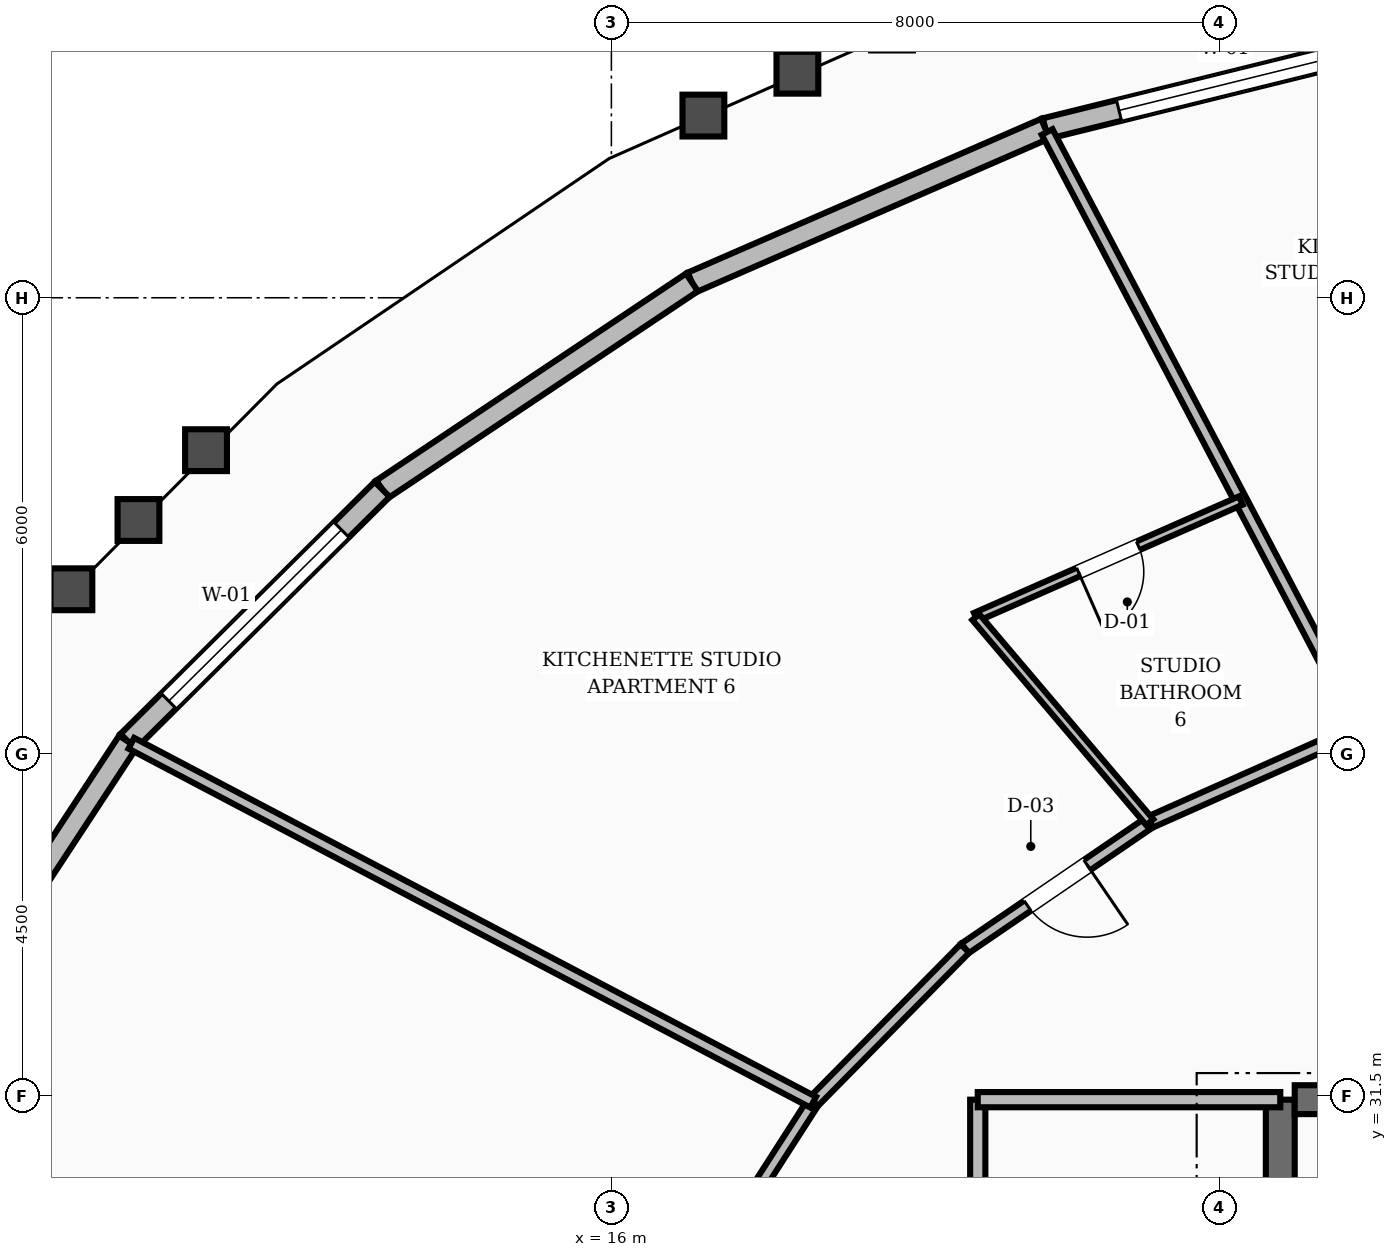
"""IFC4 building model, lengths in metres.
Left out: names, types, materials, properties, quantities, classifications, styles, units other than length and angle.
Written with IfcOpenShell. Run it as: python <this file> out.ifc"""

import sys

from ifc_helpers import new_model, si_unit, direction, frame, frame_2d, origin, place, context, subcontext, project, spatial, rectangle, extrude, element, fill, save


model = new_model("IFC4")
c1 = context("Model", 3, precision=1e-05, world=origin(), true_north=direction((0.0, 1.0)))
c2 = subcontext(c1, "Body", "Model", "MODEL_VIEW")
j1 = project(units=[si_unit("LENGTHUNIT", "METRE"), si_unit("PLANEANGLEUNIT", "RADIAN")], contexts=[c1])
p1 = place(None, origin())
s1 = spatial("IfcSite", under=j1, at=p1, CompositionType="ELEMENT")
p2 = place(p1, origin())
s2 = spatial("IfcBuilding", under=s1, at=p2, CompositionType="ELEMENT")
p3 = place(p2, frame((0.0, 0.0, 66.4)))
s3 = spatial("IfcBuildingStorey", under=s2, at=p3, CompositionType="ELEMENT", Elevation=66.4)
p4 = place(p3, frame((24.8, 25.15, 0.0), z_axis=(0.0, 0.0, 1.0), x_axis=(0.0, 1.0, 0.0)))
e1 = element("IfcWall", 1, at=p4, inside=s3, PredefinedType="SHEAR", context=c2, shape_type="SweptSolid", body=[
    extrude(rectangle(XDim=6.3, YDim=0.38, at=frame_2d((3.15, 0.0))), origin(), (0.0, 0.0, 1.0), 3.6),
])
p5 = place(p3, frame((24.99, 31.45, 0.0), z_axis=(0.0, 0.0, 1.0), x_axis=(1.0, 0.0, 0.0)))
e2 = element("IfcWall", 2, at=p5, inside=s3, PredefinedType="SHEAR", context=c2, shape_type="SweptSolid", body=[
    extrude(rectangle(XDim=3.21, YDim=0.38, at=frame_2d((1.605, 0.0))), origin(), (0.0, 0.0, 1.0), 3.6),
])
p6 = place(p3, frame((26.754, 45.471, 0.0), z_axis=(0.0, 0.0, 1.0), x_axis=(-0.970832238087, -0.239759807915, 0.0)))
e3 = element("IfcWall", 3, at=p6, inside=s3, PredefinedType="STANDARD", context=c2, shape_type="SweptSolid", body=[
    extrude(rectangle(XDim=5.196, YDim=0.28, at=frame_2d((2.598, 0.0))), origin(), (0.0, 0.0, 1.0), 2.71),
])
p7 = place(p6, frame((0.998, 0.0, 0.8)))
e4 = element("IfcOpeningElement", 4, at=p7, cuts=e3, PredefinedType="OPENING", context=c2, shape_type="SweptSolid", body=[
    extrude(rectangle(XDim=3.2, YDim=1.65, at=frame_2d((1.6, 0.825))), frame((0.0, 0.15, 0.0), z_axis=(0.0, -1.0, 0.0), x_axis=(1.0, 0.0, 0.0)), (0.0, 0.0, 1.0), 0.3),
])
p8 = place(p3, frame((21.709, 44.225, 0.0), z_axis=(0.0, 0.0, 1.0), x_axis=(-0.916956720631, -0.398986682096, 0.0)))
e5 = element("IfcWall", 5, at=p8, inside=s3, PredefinedType="STANDARD", context=c2, shape_type="SweptSolid", body=[
    extrude(rectangle(XDim=5.07, YDim=0.28, at=frame_2d((2.535, 0.0))), origin(), (0.0, 0.0, 1.0), 2.71),
])
p9 = place(p3, frame((17.06, 42.202, 0.0), z_axis=(0.0, 0.0, 1.0), x_axis=(-0.83148272081, -0.555550614251, 0.0)))
e6 = element("IfcWall", 6, at=p9, inside=s3, PredefinedType="STANDARD", context=c2, shape_type="SweptSolid", body=[
    extrude(rectangle(XDim=4.901, YDim=0.28, at=frame_2d((2.45, 0.0))), origin(), (0.0, 0.0, 1.0), 2.71),
])
p10 = place(p3, frame((12.985, 39.479, 0.0), z_axis=(0.0, 0.0, 1.0), x_axis=(-0.710003239363, -0.704198409608, 0.0)))
e7 = element("IfcWall", 7, at=p10, inside=s3, PredefinedType="STANDARD", context=c2, shape_type="SweptSolid", body=[
    extrude(rectangle(XDim=4.71, YDim=0.28, at=frame_2d((2.355, 0.0))), origin(), (0.0, 0.0, 1.0), 2.71),
])
p11 = place(p10, frame((0.755, 0.0, 0.8)))
e8 = element("IfcOpeningElement", 8, at=p11, cuts=e7, PredefinedType="OPENING", context=c2, shape_type="SweptSolid", body=[
    extrude(rectangle(XDim=3.2, YDim=1.65, at=frame_2d((1.6, 0.825))), frame((0.0, 0.15, 0.0), z_axis=(0.0, -1.0, 0.0), x_axis=(1.0, 0.0, 0.0)), (0.0, 0.0, 1.0), 0.3),
])
p12 = place(p3, frame((9.64, 36.162, 0.0), z_axis=(0.0, 0.0, 1.0), x_axis=(-0.54881308027, -0.83594509564, 0.0)))
e9 = element("IfcWall", 9, at=p12, inside=s3, PredefinedType="STANDARD", context=c2, shape_type="SweptSolid", body=[
    extrude(rectangle(XDim=4.528, YDim=0.28, at=frame_2d((2.264, 0.0))), origin(), (0.0, 0.0, 1.0), 2.71),
])
p13 = place(p3, frame((20.82, 28.32, 0.0), z_axis=(0.0, 0.0, 1.0), x_axis=(0.0, 1.0, 0.0)))
e10 = element("IfcWall", 10, at=p13, inside=s3, PredefinedType="SOLIDWALL", context=c2, shape_type="SweptSolid", body=[
    extrude(rectangle(XDim=3.13, YDim=0.2, at=frame_2d((1.565, 0.0))), origin(), (0.0, 0.0, 1.0), 2.71),
])
p14 = place(p13, frame((1.09, 0.0, 0.0)))
e11 = element("IfcOpeningElement", 11, at=p14, cuts=e10, PredefinedType="OPENING", context=c2, shape_type="SweptSolid", body=[
    extrude(rectangle(XDim=0.95, YDim=2.1, at=frame_2d((0.475, 1.05))), frame((0.0, 0.11, 0.0), z_axis=(0.0, -1.0, 0.0), x_axis=(1.0, 0.0, 0.0)), (0.0, 0.0, 1.0), 0.22),
])
p15 = place(p3, frame((20.82, 31.45, 0.0), z_axis=(0.0, 0.0, 1.0), x_axis=(1.0, 0.0, 0.0)))
e12 = element("IfcWall", 12, at=p15, inside=s3, PredefinedType="SOLIDWALL", context=c2, shape_type="SweptSolid", body=[
    extrude(rectangle(XDim=3.98, YDim=0.2, at=frame_2d((1.99, 0.0))), origin(), (0.0, 0.0, 1.0), 2.71),
])
p16 = place(p3, frame((25.858, 36.334, 0.0), z_axis=(0.0, 0.0, 1.0), x_axis=(-0.913768445178, -0.406235434936, 0.0)))
e13 = element("IfcWall", 13, at=p16, inside=s3, PredefinedType="SOLIDWALL", context=c2, shape_type="SweptSolid", body=[
    extrude(rectangle(XDim=3.037, YDim=0.16, at=frame_2d((1.519, 0.0))), origin(), (0.0, 0.0, 1.0), 2.71),
])
p17 = place(p3, frame((23.083, 35.1, 0.0), z_axis=(0.0, 0.0, 1.0), x_axis=(-0.825929039072, -0.563774088104, 0.0)))
e14 = element("IfcWall", 14, at=p17, inside=s3, PredefinedType="SOLIDWALL", context=c2, shape_type="SweptSolid", body=[
    extrude(rectangle(XDim=2.945, YDim=0.16, at=frame_2d((1.472, 0.0))), origin(), (0.0, 0.0, 1.0), 2.71),
])
p18 = place(p17, frame((0.997, 0.0, 0.0)))
e15 = element("IfcOpeningElement", 15, at=p18, cuts=e14, PredefinedType="OPENING", context=c2, shape_type="SweptSolid", body=[
    extrude(rectangle(XDim=0.95, YDim=2.1, at=frame_2d((0.475, 1.05))), frame((0.0, 0.09, 0.0), z_axis=(0.0, -1.0, 0.0), x_axis=(1.0, 0.0, 0.0)), (0.0, 0.0, 1.0), 0.18),
])
p19 = place(p3, frame((20.651, 33.44, 0.0), z_axis=(0.0, 0.0, 1.0), x_axis=(-0.702366174226, -0.711815816981, 0.0)))
e16 = element("IfcWall", 16, at=p19, inside=s3, PredefinedType="SOLIDWALL", context=c2, shape_type="SweptSolid", body=[
    extrude(rectangle(XDim=2.842, YDim=0.16, at=frame_2d((1.421, 0.0))), origin(), (0.0, 0.0, 1.0), 2.71),
])
p20 = place(p3, frame((18.655, 31.417, 0.0), z_axis=(0.0, 0.0, 1.0), x_axis=(-0.540595670038, -0.841282545603, 0.0)))
e17 = element("IfcWall", 17, at=p20, inside=s3, PredefinedType="SOLIDWALL", context=c2, shape_type="SweptSolid", body=[
    extrude(rectangle(XDim=2.744, YDim=0.16, at=frame_2d((1.372, 0.0))), origin(), (0.0, 0.0, 1.0), 2.71),
])
p21 = place(p3, frame((25.858, 36.334, 0.0), z_axis=(0.0, 0.0, 1.0), x_axis=(-0.465340061266, 0.885131983029, 0.0)))
e18 = element("IfcWall", 18, at=p21, inside=s3, PredefinedType="SOLIDWALL", context=c2, shape_type="SweptSolid", body=[
    extrude(rectangle(XDim=8.865, YDim=0.16, at=frame_2d((4.433, 0.0))), origin(), (0.0, 0.0, 1.0), 2.71),
])
p22 = place(p3, frame((24.281, 39.333, 0.0), z_axis=(0.0, 0.0, 1.0), x_axis=(-0.915384944757, -0.40257968517, 0.0)))
e19 = element("IfcWall", 19, at=p22, inside=s3, PredefinedType="PARTITIONING", context=c2, shape_type="SweptSolid", body=[
    extrude(rectangle(XDim=3.81, YDim=0.12, at=frame_2d((1.905, 0.0))), origin(), (0.0, 0.0, 1.0), 2.71),
])
p23 = place(p22, frame((1.475, 0.0, 0.0)))
e20 = element("IfcOpeningElement", 20, at=p23, cuts=e19, PredefinedType="OPENING", context=c2, shape_type="SweptSolid", body=[
    extrude(rectangle(XDim=0.86, YDim=2.1, at=frame_2d((0.43, 1.05))), frame((0.0, 0.07, 0.0), z_axis=(0.0, -1.0, 0.0), x_axis=(1.0, 0.0, 0.0)), (0.0, 0.0, 1.0), 0.14),
])
p24 = place(p3, frame((23.083, 35.1, 0.0), z_axis=(0.0, 0.0, 1.0), x_axis=(-0.646810898815, 0.76265041872, 0.0)))
e21 = element("IfcWall", 21, at=p24, inside=s3, PredefinedType="PARTITIONING", context=c2, shape_type="SweptSolid", body=[
    extrude(rectangle(XDim=3.539, YDim=0.12, at=frame_2d((1.769, 0.0))), origin(), (0.0, 0.0, 1.0), 2.71),
])
p25 = place(p3, frame((18.655, 31.417, 0.0), z_axis=(0.0, 0.0, 1.0), x_axis=(-0.88488217161, 0.465814922868, 0.0)))
e22 = element("IfcWall", 22, at=p25, inside=s3, PredefinedType="SOLIDWALL", context=c2, shape_type="SweptSolid", body=[
    extrude(rectangle(XDim=10.137, YDim=0.16, at=frame_2d((5.068, 0.0))), origin(), (0.0, 0.0, 1.0), 2.71),
])
p26 = place(p7, origin())
e23 = element("IfcWindow", 23, at=p26, inside=s3, PartitioningType="SINGLE_PANEL", PredefinedType="WINDOW", context=c2, shape_type="SweptSolid", body=[
    extrude(rectangle(XDim=3.2, YDim=1.65, at=frame_2d((1.6, 0.825))), frame((0.0, 0.03, 0.0), z_axis=(0.0, -1.0, 0.0), x_axis=(1.0, 0.0, 0.0)), (0.0, 0.0, 1.0), 0.06),
])
fill(e4, e23)
p27 = place(p11, origin())
e24 = element("IfcWindow", 24, at=p27, inside=s3, PartitioningType="SINGLE_PANEL", PredefinedType="WINDOW", context=c2, shape_type="SweptSolid", body=[
    extrude(rectangle(XDim=3.2, YDim=1.65, at=frame_2d((1.6, 0.825))), frame((0.0, 0.03, 0.0), z_axis=(0.0, -1.0, 0.0), x_axis=(1.0, 0.0, 0.0)), (0.0, 0.0, 1.0), 0.06),
])
fill(e8, e24)
p28 = place(p23, origin())
e25 = element("IfcDoor", 25, at=p28, inside=s3, OperationType="SINGLE_SWING_RIGHT", PredefinedType="DOOR", context=c2, shape_type="SweptSolid", body=[
    extrude(rectangle(XDim=0.86, YDim=2.1, at=frame_2d((0.43, 1.05))), frame((0.0, 0.025, 0.0), z_axis=(0.0, -1.0, 0.0), x_axis=(1.0, 0.0, 0.0)), (0.0, 0.0, 1.0), 0.05),
])
fill(e20, e25)
p29 = place(p18, origin())
e26 = element("IfcDoor", 26, at=p29, inside=s3, OperationType="SINGLE_SWING_LEFT", PredefinedType="DOOR", context=c2, shape_type="SweptSolid", body=[
    extrude(rectangle(XDim=0.95, YDim=2.1, at=frame_2d((0.475, 1.05))), frame((0.0, 0.025, 0.0), z_axis=(0.0, -1.0, 0.0), x_axis=(1.0, 0.0, 0.0)), (0.0, 0.0, 1.0), 0.05),
])
fill(e15, e26)
save(model, sys.argv[1])
